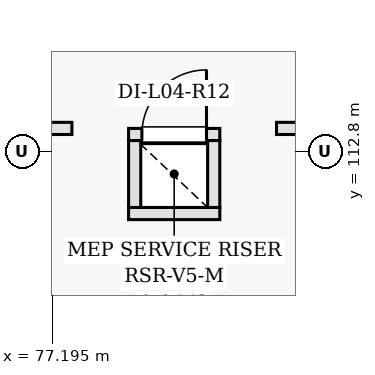
"""IFC4 building model, lengths in metres.
Left out: names, types, materials, properties, quantities, classifications, styles, units other than length and angle.
Written with IfcOpenShell. Run it as: python <this file> out.ifc"""

import sys

from ifc_helpers import new_model, si_unit, direction, frame, frame_2d, origin, place, context, subcontext, project, spatial, rectangle, extrude, element, fill, save


model = new_model("IFC4")
c1 = context("Model", 3, precision=1e-05, world=origin(), true_north=direction((0.0, 1.0)))
c2 = subcontext(c1, "Body", "Model", "MODEL_VIEW")
j1 = project(units=[si_unit("LENGTHUNIT", "METRE"), si_unit("PLANEANGLEUNIT", "RADIAN")], contexts=[c1])
p1 = place(None, origin())
s1 = spatial("IfcSite", under=j1, at=p1, CompositionType="ELEMENT")
p2 = place(p1, origin())
s2 = spatial("IfcBuilding", under=s1, at=p2, CompositionType="ELEMENT")
p3 = place(p2, frame((0.0, 0.0, 18.0)))
s3 = spatial("IfcBuildingStorey", under=s2, at=p3, CompositionType="ELEMENT", Elevation=18.0)
p4 = place(p3, frame((78.2, 111.98, 0.0), z_axis=(0.0, 0.0, 1.0), x_axis=(1.0, 0.0, 0.0)))
e1 = element("IfcWall", 1, at=p4, inside=s3, PredefinedType="PARTITIONING", context=c2, shape_type="SweptSolid", body=[
    extrude(rectangle(XDim=1.2, YDim=0.16, at=frame_2d((0.6, 0.0))), origin(), (0.0, 0.0, 1.0), 3.98),
])
p5 = place(p3, frame((78.2, 113.02, 0.0), z_axis=(0.0, 0.0, 1.0), x_axis=(1.0, 0.0, 0.0)))
e2 = element("IfcWall", 2, at=p5, inside=s3, PredefinedType="PARTITIONING", context=c2, shape_type="SweptSolid", body=[
    extrude(rectangle(XDim=1.2, YDim=0.16, at=frame_2d((0.6, 0.0))), origin(), (0.0, 0.0, 1.0), 3.98),
])
p6 = place(p5, frame((0.175, 0.0, 0.0)))
e3 = element("IfcOpeningElement", 3, at=p6, cuts=e2, PredefinedType="OPENING", context=c2, shape_type="SweptSolid", body=[
    extrude(rectangle(XDim=0.85, YDim=2.02, at=frame_2d((0.425, 1.01))), frame((0.0, 0.09, 0.0), z_axis=(0.0, -1.0, 0.0), x_axis=(1.0, 0.0, 0.0)), (0.0, 0.0, 1.0), 0.18),
])
for number, where, z_axis, x_axis in (
    (4, (78.28, 112.06, 0.0), (0.0, 0.0, 1.0), (0.0, 1.0, 0.0)),
    (5, (79.32, 112.06, 0.0), (0.0, 0.0, 1.0), (0.0, 1.0, 0.0)),
):
    element("IfcWall", number, at=place(p3, frame(where, z_axis=z_axis, x_axis=x_axis)), inside=s3, PredefinedType="PARTITIONING", context=c2, shape_type="SweptSolid", body=[
        extrude(rectangle(XDim=0.88, YDim=0.16, at=frame_2d((0.44, 0.0))), origin(), (0.0, 0.0, 1.0), 3.98),
    ])
p7 = place(p3, frame((80.146, 113.1, 0.0), z_axis=(0.0, 0.0, 1.0), x_axis=(1.0, 0.0, 0.0)))
e6 = element("IfcWall", 6, at=p7, inside=s3, PredefinedType="PARTITIONING", context=c2, shape_type="SweptSolid", body=[
    extrude(rectangle(XDim=4.834, YDim=0.16, at=frame_2d((2.417, 0.0))), origin(), (0.0, 0.0, 1.0), 3.94),
])
p8 = place(p3, frame((39.44, 113.1, 0.0), z_axis=(0.0, 0.0, 1.0), x_axis=(1.0, 0.0, 0.0)))
e7 = element("IfcWall", 7, at=p8, inside=s3, PredefinedType="PARTITIONING", context=c2, shape_type="SweptSolid", body=[
    extrude(rectangle(XDim=38.014, YDim=0.16, at=frame_2d((19.007, 0.0))), origin(), (0.0, 0.0, 1.0), 3.94),
])
p9 = place(p6, origin())
e8 = element("IfcDoor", 8, at=p9, inside=s3, OperationType="SINGLE_SWING_RIGHT", PredefinedType="DOOR", context=c2, shape_type="SweptSolid", body=[
    extrude(rectangle(XDim=0.85, YDim=2.02, at=frame_2d((0.425, 1.01))), frame((0.0, 0.025, 0.0), z_axis=(0.0, -1.0, 0.0), x_axis=(1.0, 0.0, 0.0)), (0.0, 0.0, 1.0), 0.05),
])
fill(e3, e8)
save(model, sys.argv[1])
